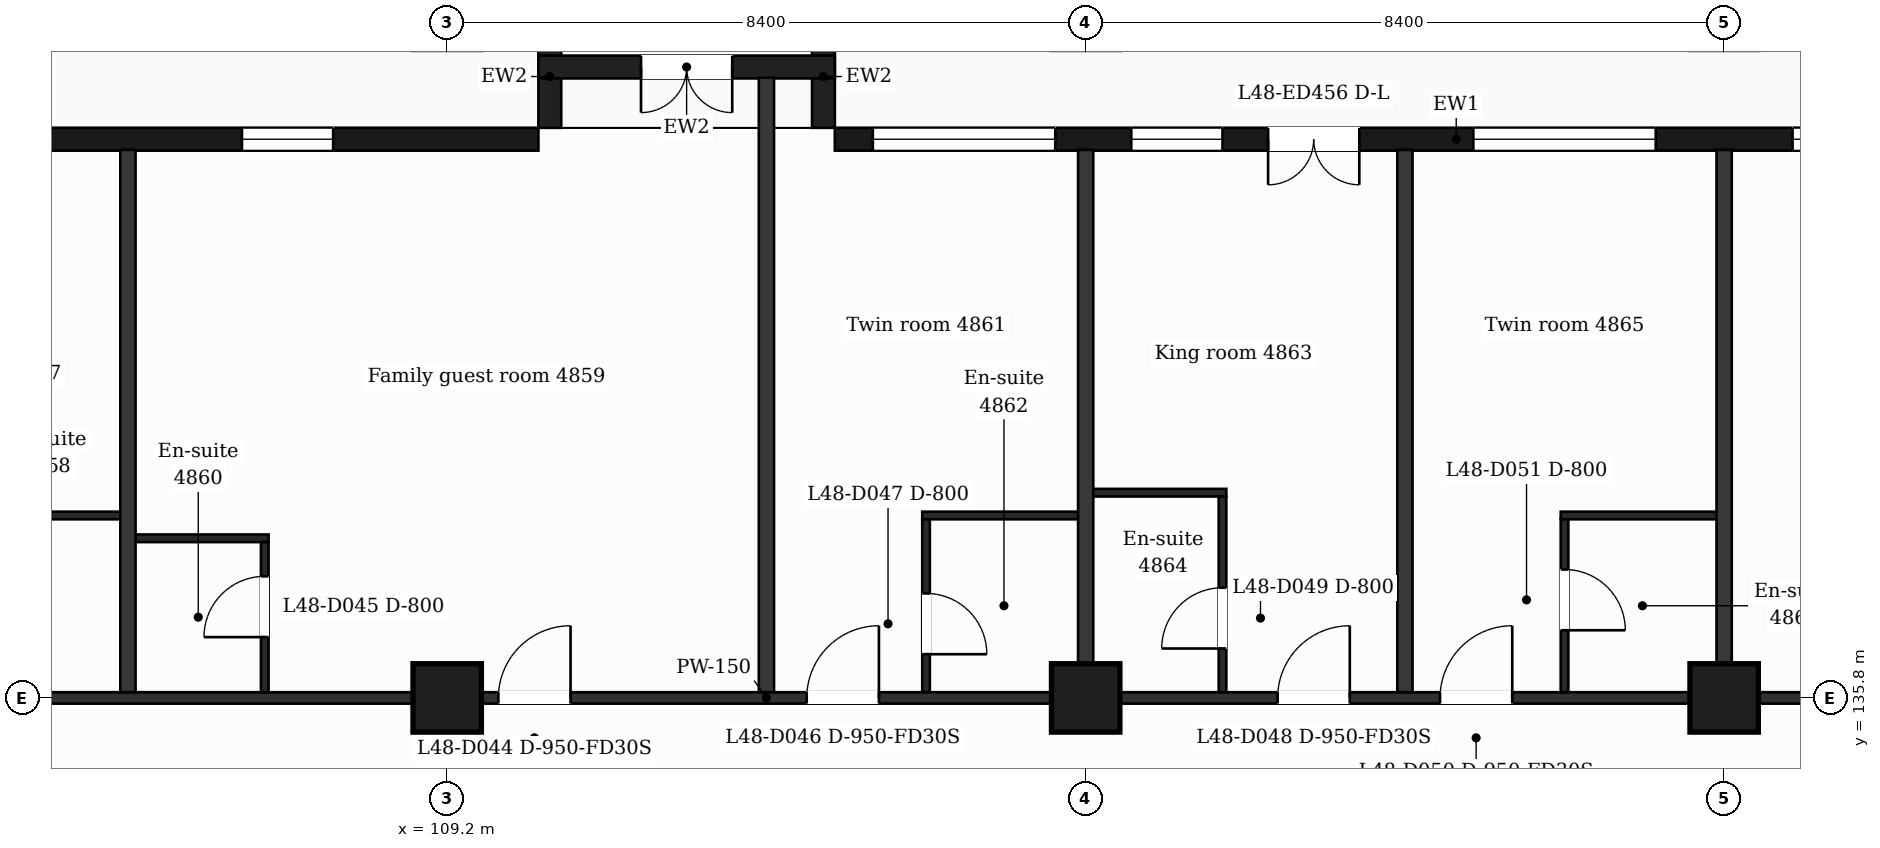
"""IFC4 building model, lengths in metres.
Left out: names, types, materials, properties, quantities, classifications, styles, units other than length and angle.
Written with IfcOpenShell. Run it as: python <this file> out.ifc"""

import sys

from ifc_helpers import new_model, si_unit, direction, frame, frame_2d, origin, origin_2d, place, context, subcontext, project, spatial, rectangle, extrude, element, fill, save


model = new_model("IFC4")
c1 = context("Model", 3, precision=1e-05, world=origin(), true_north=direction((0.0, 1.0)))
c2 = subcontext(c1, "Body", "Model", "MODEL_VIEW")
j1 = project(units=[si_unit("LENGTHUNIT", "METRE"), si_unit("PLANEANGLEUNIT", "RADIAN")], contexts=[c1])
p1 = place(None, origin())
s1 = spatial("IfcSite", under=j1, at=p1, CompositionType="ELEMENT")
p2 = place(p1, origin())
s2 = spatial("IfcBuilding", under=s1, at=p2, CompositionType="ELEMENT")
p3 = place(p2, frame((0.0, 0.0, 202.2)))
s3 = spatial("IfcBuildingStorey", under=s2, at=p3, CompositionType="ELEMENT", Elevation=202.2)
for number, where, z_axis, x_axis in (
    (1, (109.2, 135.8, 0.0), (0.0, 0.0, 1.0), (1.0, 0.0, 0.0)),
    (2, (117.6, 135.8, 0.0), (0.0, 0.0, 1.0), (1.0, 0.0, 0.0)),
    (3, (126.0, 135.8, 0.0), (0.0, 0.0, 1.0), (1.0, 0.0, 0.0)),
):
    element("IfcColumn", number, at=place(p3, frame(where, z_axis=z_axis, x_axis=x_axis)), inside=s3, PredefinedType="COLUMN", context=c2, shape_type="SweptSolid", body=[
        extrude(rectangle(XDim=0.9, YDim=0.9, at=origin_2d()), origin(), (0.0, 0.0, 1.0), 3.7),
    ])
p4 = place(p3, frame((130.65, 143.15, 0.0), z_axis=(0.0, 0.0, 1.0), x_axis=(-1.0, 0.0, 0.0)))
e4 = element("IfcWall", 4, at=p4, inside=s3, PredefinedType="SOLIDWALL", context=c2, shape_type="SweptSolid", body=[
    extrude(rectangle(XDim=16.35, YDim=0.3, at=frame_2d((8.175, 0.0))), origin(), (0.0, 0.0, 1.0), 3.38),
])
p5 = place(p4, frame((1.35, 0.0, 0.9)))
e5 = element("IfcOpeningElement", 5, at=p5, cuts=e4, PredefinedType="OPENING", context=c2, shape_type="SweptSolid", body=[
    extrude(rectangle(XDim=2.4, YDim=2.1, at=frame_2d((1.2, 1.05))), frame((0.0, 0.16, 0.0), z_axis=(0.0, -1.0, 0.0), x_axis=(1.0, 0.0, 0.0)), (0.0, 0.0, 1.0), 0.32),
])
p6 = place(p4, frame((5.55, 0.0, 0.9)))
e6 = element("IfcOpeningElement", 6, at=p6, cuts=e4, PredefinedType="OPENING", context=c2, shape_type="SweptSolid", body=[
    extrude(rectangle(XDim=2.4, YDim=2.1, at=frame_2d((1.2, 1.05))), frame((0.0, 0.16, 0.0), z_axis=(0.0, -1.0, 0.0), x_axis=(1.0, 0.0, 0.0)), (0.0, 0.0, 1.0), 0.32),
])
p7 = place(p4, frame((9.45, 0.0, 0.0)))
e7 = element("IfcOpeningElement", 7, at=p7, cuts=e4, PredefinedType="OPENING", context=c2, shape_type="SweptSolid", body=[
    extrude(rectangle(XDim=1.2, YDim=2.4, at=frame_2d((0.6, 1.2))), frame((0.0, 0.16, 0.0), z_axis=(0.0, -1.0, 0.0), x_axis=(1.0, 0.0, 0.0)), (0.0, 0.0, 1.0), 0.32),
])
p8 = place(p4, frame((11.25, 0.0, 0.9)))
e8 = element("IfcOpeningElement", 8, at=p8, cuts=e4, PredefinedType="OPENING", context=c2, shape_type="SweptSolid", body=[
    extrude(rectangle(XDim=1.2, YDim=2.1, at=frame_2d((0.6, 1.05))), frame((0.0, 0.16, 0.0), z_axis=(0.0, -1.0, 0.0), x_axis=(1.0, 0.0, 0.0)), (0.0, 0.0, 1.0), 0.32),
])
p9 = place(p4, frame((13.45, 0.0, 0.9)))
e9 = element("IfcOpeningElement", 9, at=p9, cuts=e4, PredefinedType="OPENING", context=c2, shape_type="SweptSolid", body=[
    extrude(rectangle(XDim=2.4, YDim=2.1, at=frame_2d((1.2, 1.05))), frame((0.0, 0.16, 0.0), z_axis=(0.0, -1.0, 0.0), x_axis=(1.0, 0.0, 0.0)), (0.0, 0.0, 1.0), 0.32),
])
p10 = place(p3, frame((110.4, 143.15, 0.0), z_axis=(0.0, 0.0, 1.0), x_axis=(-1.0, 0.0, 0.0)))
e10 = element("IfcWall", 10, at=p10, inside=s3, PredefinedType="SOLIDWALL", context=c2, shape_type="SweptSolid", body=[
    extrude(rectangle(XDim=14.4, YDim=0.3, at=frame_2d((7.2, 0.0))), origin(), (0.0, 0.0, 1.0), 3.38),
])
p11 = place(p10, frame((2.7, 0.0, 0.9)))
e11 = element("IfcOpeningElement", 11, at=p11, cuts=e10, PredefinedType="OPENING", context=c2, shape_type="SweptSolid", body=[
    extrude(rectangle(XDim=1.2, YDim=2.1, at=frame_2d((0.6, 1.05))), frame((0.0, 0.16, 0.0), z_axis=(0.0, -1.0, 0.0), x_axis=(1.0, 0.0, 0.0)), (0.0, 0.0, 1.0), 0.32),
])
p12 = place(p10, frame((6.9, 0.0, 0.0)))
e12 = element("IfcOpeningElement", 12, at=p12, cuts=e10, PredefinedType="OPENING", context=c2, shape_type="SweptSolid", body=[
    extrude(rectangle(XDim=1.2, YDim=2.4, at=frame_2d((0.6, 1.2))), frame((0.0, 0.16, 0.0), z_axis=(0.0, -1.0, 0.0), x_axis=(1.0, 0.0, 0.0)), (0.0, 0.0, 1.0), 0.32),
])
p13 = place(p10, frame((10.5, 0.0, 0.9)))
e13 = element("IfcOpeningElement", 13, at=p13, cuts=e10, PredefinedType="OPENING", context=c2, shape_type="SweptSolid", body=[
    extrude(rectangle(XDim=2.4, YDim=2.1, at=frame_2d((1.2, 1.05))), frame((0.0, 0.16, 0.0), z_axis=(0.0, -1.0, 0.0), x_axis=(1.0, 0.0, 0.0)), (0.0, 0.0, 1.0), 0.32),
])
for number, where, z_axis, x_axis in (
    (14, (114.15, 143.3, 0.0), (0.0, 0.0, 1.0), (0.0, 1.0, 0.0)),
    (15, (110.55, 143.3, 0.0), (0.0, 0.0, 1.0), (0.0, 1.0, 0.0)),
):
    element("IfcWall", number, at=place(p3, frame(where, z_axis=z_axis, x_axis=x_axis)), inside=s3, PredefinedType="SOLIDWALL", context=c2, shape_type="SweptSolid", body=[
        extrude(rectangle(XDim=1.35, YDim=0.3, at=frame_2d((0.675, 0.0))), origin(), (0.0, 0.0, 1.0), 3.38),
    ])
p14 = place(p3, frame((114.3, 144.1, 0.0), z_axis=(0.0, 0.0, 1.0), x_axis=(-1.0, 0.0, 0.0)))
e16 = element("IfcWall", 16, at=p14, inside=s3, PredefinedType="SOLIDWALL", context=c2, shape_type="SweptSolid", body=[
    extrude(rectangle(XDim=3.9, YDim=0.3, at=frame_2d((1.95, 0.0))), origin(), (0.0, 0.0, 1.0), 3.38),
])
p15 = place(p14, frame((1.35, 0.0, 0.0)))
e17 = element("IfcOpeningElement", 17, at=p15, cuts=e16, PredefinedType="OPENING", context=c2, shape_type="SweptSolid", body=[
    extrude(rectangle(XDim=1.2, YDim=2.4, at=frame_2d((0.6, 1.2))), frame((0.0, 0.16, 0.0), z_axis=(0.0, -1.0, 0.0), x_axis=(1.0, 0.0, 0.0)), (0.0, 0.0, 1.0), 0.32),
])
p16 = place(p3, frame((90.895, 135.8, 0.0), z_axis=(0.0, 0.0, 1.0), x_axis=(1.0, 0.0, 0.0)))
e18 = element("IfcWall", 18, at=p16, inside=s3, PredefinedType="PARTITIONING", context=c2, shape_type="SweptSolid", body=[
    extrude(rectangle(XDim=45.011, YDim=0.15, at=frame_2d((22.505, 0.0))), origin(), (0.0, 0.0, 1.0), 3.38),
])
p17 = place(p16, frame((7.675, 0.0, 0.0)))
e19 = element("IfcOpeningElement", 19, at=p17, cuts=e18, PredefinedType="OPENING", context=c2, shape_type="SweptSolid", body=[
    extrude(rectangle(XDim=1.0, YDim=2.1, at=frame_2d((0.5, 1.05))), frame((0.0, 0.085, 0.0), z_axis=(0.0, -1.0, 0.0), x_axis=(1.0, 0.0, 0.0)), (0.0, 0.0, 1.0), 0.17),
])
p18 = place(p16, frame((10.575, 0.0, 0.0)))
e20 = element("IfcOpeningElement", 20, at=p18, cuts=e18, PredefinedType="OPENING", context=c2, shape_type="SweptSolid", body=[
    extrude(rectangle(XDim=0.95, YDim=2.1, at=frame_2d((0.475, 1.05))), frame((0.0, 0.085, 0.0), z_axis=(0.0, -1.0, 0.0), x_axis=(1.0, 0.0, 0.0)), (0.0, 0.0, 1.0), 0.17),
])
p19 = place(p16, frame((18.979, 0.0, 0.0)))
e21 = element("IfcOpeningElement", 21, at=p19, cuts=e18, PredefinedType="OPENING", context=c2, shape_type="SweptSolid", body=[
    extrude(rectangle(XDim=0.95, YDim=2.1, at=frame_2d((0.475, 1.05))), frame((0.0, 0.085, 0.0), z_axis=(0.0, -1.0, 0.0), x_axis=(1.0, 0.0, 0.0)), (0.0, 0.0, 1.0), 0.17),
])
p20 = place(p16, frame((23.035, 0.0, 0.0)))
e22 = element("IfcOpeningElement", 22, at=p20, cuts=e18, PredefinedType="OPENING", context=c2, shape_type="SweptSolid", body=[
    extrude(rectangle(XDim=0.95, YDim=2.1, at=frame_2d((0.475, 1.05))), frame((0.0, 0.085, 0.0), z_axis=(0.0, -1.0, 0.0), x_axis=(1.0, 0.0, 0.0)), (0.0, 0.0, 1.0), 0.17),
])
p21 = place(p16, frame((29.23, 0.0, 0.0)))
e23 = element("IfcOpeningElement", 23, at=p21, cuts=e18, PredefinedType="OPENING", context=c2, shape_type="SweptSolid", body=[
    extrude(rectangle(XDim=0.95, YDim=2.1, at=frame_2d((0.475, 1.05))), frame((0.0, 0.085, 0.0), z_axis=(0.0, -1.0, 0.0), x_axis=(1.0, 0.0, 0.0)), (0.0, 0.0, 1.0), 0.17),
])
p22 = place(p16, frame((31.367, 0.0, 0.0)))
e24 = element("IfcOpeningElement", 24, at=p22, cuts=e18, PredefinedType="OPENING", context=c2, shape_type="SweptSolid", body=[
    extrude(rectangle(XDim=0.95, YDim=2.1, at=frame_2d((0.475, 1.05))), frame((0.0, 0.085, 0.0), z_axis=(0.0, -1.0, 0.0), x_axis=(1.0, 0.0, 0.0)), (0.0, 0.0, 1.0), 0.17),
])
p23 = place(p16, frame((39.814, 0.0, 0.0)))
e25 = element("IfcOpeningElement", 25, at=p23, cuts=e18, PredefinedType="OPENING", context=c2, shape_type="SweptSolid", body=[
    extrude(rectangle(XDim=0.95, YDim=2.1, at=frame_2d((0.475, 1.05))), frame((0.0, 0.085, 0.0), z_axis=(0.0, -1.0, 0.0), x_axis=(1.0, 0.0, 0.0)), (0.0, 0.0, 1.0), 0.17),
])
p24 = place(p3, frame((105.0, 137.9, 0.0), z_axis=(0.0, 0.0, 1.0), x_axis=(1.0, 0.0, 0.0)))
e26 = element("IfcWall", 26, at=p24, inside=s3, PredefinedType="PARTITIONING", context=c2, shape_type="SweptSolid", body=[
    extrude(rectangle(XDim=1.85, YDim=0.1, at=frame_2d((0.925, 0.0))), origin(), (0.0, 0.0, 1.0), 3.38),
])
p25 = place(p3, frame((102.85, 138.2, 0.0), z_axis=(0.0, 0.0, 1.0), x_axis=(1.0, 0.0, 0.0)))
e27 = element("IfcWall", 27, at=p25, inside=s3, PredefinedType="PARTITIONING", context=c2, shape_type="SweptSolid", body=[
    extrude(rectangle(XDim=2.15, YDim=0.1, at=frame_2d((1.075, 0.0))), origin(), (0.0, 0.0, 1.0), 3.38),
])
p26 = place(p3, frame((115.45, 138.2, 0.0), z_axis=(0.0, 0.0, 1.0), x_axis=(1.0, 0.0, 0.0)))
e28 = element("IfcWall", 28, at=p26, inside=s3, PredefinedType="PARTITIONING", context=c2, shape_type="SweptSolid", body=[
    extrude(rectangle(XDim=2.15, YDim=0.1, at=frame_2d((1.075, 0.0))), origin(), (0.0, 0.0, 1.0), 3.38),
])
p27 = place(p3, frame((123.85, 138.2, 0.0), z_axis=(0.0, 0.0, 1.0), x_axis=(1.0, 0.0, 0.0)))
e29 = element("IfcWall", 29, at=p27, inside=s3, PredefinedType="PARTITIONING", context=c2, shape_type="SweptSolid", body=[
    extrude(rectangle(XDim=2.15, YDim=0.1, at=frame_2d((1.075, 0.0))), origin(), (0.0, 0.0, 1.0), 3.38),
])
p28 = place(p3, frame((117.6, 138.5, 0.0), z_axis=(0.0, 0.0, 1.0), x_axis=(1.0, 0.0, 0.0)))
e30 = element("IfcWall", 30, at=p28, inside=s3, PredefinedType="PARTITIONING", context=c2, shape_type="SweptSolid", body=[
    extrude(rectangle(XDim=1.85, YDim=0.1, at=frame_2d((0.925, 0.0))), origin(), (0.0, 0.0, 1.0), 3.38),
])
p29 = place(p3, frame((105.0, 135.875, 0.0), z_axis=(0.0, 0.0, 1.0), x_axis=(0.0, 1.0, 0.0)))
e31 = element("IfcWall", 31, at=p29, inside=s3, PredefinedType="PARTITIONING", context=c2, shape_type="SweptSolid", body=[
    extrude(rectangle(XDim=7.135, YDim=0.2, at=frame_2d((3.567, 0.0))), origin(), (0.0, 0.0, 1.0), 3.38),
])
p30 = place(p3, frame((106.8, 135.875, 0.0), z_axis=(0.0, 0.0, 1.0), x_axis=(0.0, 1.0, 0.0)))
e32 = element("IfcWall", 32, at=p30, inside=s3, PredefinedType="PARTITIONING", context=c2, shape_type="SweptSolid", body=[
    extrude(rectangle(XDim=1.975, YDim=0.1, at=frame_2d((0.988, 0.0))), origin(), (0.0, 0.0, 1.0), 3.38),
])
p31 = place(p30, frame((0.725, 0.0, 0.0)))
e33 = element("IfcOpeningElement", 33, at=p31, cuts=e32, PredefinedType="OPENING", context=c2, shape_type="SweptSolid", body=[
    extrude(rectangle(XDim=0.8, YDim=2.1, at=frame_2d((0.4, 1.05))), frame((0.0, 0.06, 0.0), z_axis=(0.0, -1.0, 0.0), x_axis=(1.0, 0.0, 0.0)), (0.0, 0.0, 1.0), 0.12),
])
p32 = place(p3, frame((113.4, 135.875, 0.0), z_axis=(0.0, 0.0, 1.0), x_axis=(0.0, 1.0, 0.0)))
e34 = element("IfcWall", 34, at=p32, inside=s3, PredefinedType="PARTITIONING", context=c2, shape_type="SweptSolid", body=[
    extrude(rectangle(XDim=8.085, YDim=0.2, at=frame_2d((4.042, 0.0))), origin(), (0.0, 0.0, 1.0), 3.38),
])
p33 = place(p3, frame((115.5, 135.875, 0.0), z_axis=(0.0, 0.0, 1.0), x_axis=(0.0, 1.0, 0.0)))
e35 = element("IfcWall", 35, at=p33, inside=s3, PredefinedType="PARTITIONING", context=c2, shape_type="SweptSolid", body=[
    extrude(rectangle(XDim=2.275, YDim=0.1, at=frame_2d((1.137, 0.0))), origin(), (0.0, 0.0, 1.0), 3.38),
])
p34 = place(p33, frame((0.5, 0.0, 0.0)))
e36 = element("IfcOpeningElement", 36, at=p34, cuts=e35, PredefinedType="OPENING", context=c2, shape_type="SweptSolid", body=[
    extrude(rectangle(XDim=0.8, YDim=2.1, at=frame_2d((0.4, 1.05))), frame((0.0, 0.06, 0.0), z_axis=(0.0, -1.0, 0.0), x_axis=(1.0, 0.0, 0.0)), (0.0, 0.0, 1.0), 0.12),
])
p35 = place(p3, frame((117.6, 135.875, 0.0), z_axis=(0.0, 0.0, 1.0), x_axis=(0.0, 1.0, 0.0)))
e37 = element("IfcWall", 37, at=p35, inside=s3, PredefinedType="PARTITIONING", context=c2, shape_type="SweptSolid", body=[
    extrude(rectangle(XDim=7.135, YDim=0.2, at=frame_2d((3.567, 0.0))), origin(), (0.0, 0.0, 1.0), 3.38),
])
p36 = place(p3, frame((119.4, 135.875, 0.0), z_axis=(0.0, 0.0, 1.0), x_axis=(0.0, 1.0, 0.0)))
e38 = element("IfcWall", 38, at=p36, inside=s3, PredefinedType="PARTITIONING", context=c2, shape_type="SweptSolid", body=[
    extrude(rectangle(XDim=2.575, YDim=0.1, at=frame_2d((1.288, 0.0))), origin(), (0.0, 0.0, 1.0), 3.38),
])
p37 = place(p36, frame((0.575, 0.0, 0.0)))
e39 = element("IfcOpeningElement", 39, at=p37, cuts=e38, PredefinedType="OPENING", context=c2, shape_type="SweptSolid", body=[
    extrude(rectangle(XDim=0.8, YDim=2.1, at=frame_2d((0.4, 1.05))), frame((0.0, 0.06, 0.0), z_axis=(0.0, -1.0, 0.0), x_axis=(1.0, 0.0, 0.0)), (0.0, 0.0, 1.0), 0.12),
])
p38 = place(p3, frame((121.8, 135.875, 0.0), z_axis=(0.0, 0.0, 1.0), x_axis=(0.0, 1.0, 0.0)))
e40 = element("IfcWall", 40, at=p38, inside=s3, PredefinedType="PARTITIONING", context=c2, shape_type="SweptSolid", body=[
    extrude(rectangle(XDim=7.135, YDim=0.2, at=frame_2d((3.567, 0.0))), origin(), (0.0, 0.0, 1.0), 3.38),
])
p39 = place(p3, frame((123.9, 135.875, 0.0), z_axis=(0.0, 0.0, 1.0), x_axis=(0.0, 1.0, 0.0)))
e41 = element("IfcWall", 41, at=p39, inside=s3, PredefinedType="PARTITIONING", context=c2, shape_type="SweptSolid", body=[
    extrude(rectangle(XDim=2.275, YDim=0.1, at=frame_2d((1.137, 0.0))), origin(), (0.0, 0.0, 1.0), 3.38),
])
p40 = place(p39, frame((0.815, 0.0, 0.0)))
e42 = element("IfcOpeningElement", 42, at=p40, cuts=e41, PredefinedType="OPENING", context=c2, shape_type="SweptSolid", body=[
    extrude(rectangle(XDim=0.8, YDim=2.1, at=frame_2d((0.4, 1.05))), frame((0.0, 0.06, 0.0), z_axis=(0.0, -1.0, 0.0), x_axis=(1.0, 0.0, 0.0)), (0.0, 0.0, 1.0), 0.12),
])
p41 = place(p3, frame((126.0, 135.875, 0.0), z_axis=(0.0, 0.0, 1.0), x_axis=(0.0, 1.0, 0.0)))
e43 = element("IfcWall", 43, at=p41, inside=s3, PredefinedType="PARTITIONING", context=c2, shape_type="SweptSolid", body=[
    extrude(rectangle(XDim=7.135, YDim=0.2, at=frame_2d((3.567, 0.0))), origin(), (0.0, 0.0, 1.0), 3.38),
])
p42 = place(p5, origin())
e44 = element("IfcWindow", 44, at=p42, inside=s3, PartitioningType="SINGLE_PANEL", PredefinedType="WINDOW", context=c2, shape_type="SweptSolid", body=[
    extrude(rectangle(XDim=2.4, YDim=2.1, at=frame_2d((1.2, 1.05))), frame((0.0, 0.03, 0.0), z_axis=(0.0, -1.0, 0.0), x_axis=(1.0, 0.0, 0.0)), (0.0, 0.0, 1.0), 0.06),
])
fill(e5, e44)
p43 = place(p6, origin())
e45 = element("IfcWindow", 45, at=p43, inside=s3, PartitioningType="SINGLE_PANEL", PredefinedType="WINDOW", context=c2, shape_type="SweptSolid", body=[
    extrude(rectangle(XDim=2.4, YDim=2.1, at=frame_2d((1.2, 1.05))), frame((0.0, 0.03, 0.0), z_axis=(0.0, -1.0, 0.0), x_axis=(1.0, 0.0, 0.0)), (0.0, 0.0, 1.0), 0.06),
])
fill(e6, e45)
p44 = place(p7, origin())
e46 = element("IfcDoor", 46, at=p44, inside=s3, OperationType="DOUBLE_DOOR_SINGLE_SWING", PredefinedType="DOOR", context=c2, shape_type="SweptSolid", body=[
    extrude(rectangle(XDim=1.2, YDim=2.4, at=frame_2d((0.6, 1.2))), frame((0.0, 0.025, 0.0), z_axis=(0.0, -1.0, 0.0), x_axis=(1.0, 0.0, 0.0)), (0.0, 0.0, 1.0), 0.05),
])
fill(e7, e46)
p45 = place(p8, origin())
e47 = element("IfcWindow", 47, at=p45, inside=s3, PartitioningType="SINGLE_PANEL", PredefinedType="WINDOW", context=c2, shape_type="SweptSolid", body=[
    extrude(rectangle(XDim=1.2, YDim=2.1, at=frame_2d((0.6, 1.05))), frame((0.0, 0.03, 0.0), z_axis=(0.0, -1.0, 0.0), x_axis=(1.0, 0.0, 0.0)), (0.0, 0.0, 1.0), 0.06),
])
fill(e8, e47)
p46 = place(p9, origin())
e48 = element("IfcWindow", 48, at=p46, inside=s3, PartitioningType="SINGLE_PANEL", PredefinedType="WINDOW", context=c2, shape_type="SweptSolid", body=[
    extrude(rectangle(XDim=2.4, YDim=2.1, at=frame_2d((1.2, 1.05))), frame((0.0, 0.03, 0.0), z_axis=(0.0, -1.0, 0.0), x_axis=(1.0, 0.0, 0.0)), (0.0, 0.0, 1.0), 0.06),
])
fill(e9, e48)
p47 = place(p11, origin())
e49 = element("IfcWindow", 49, at=p47, inside=s3, PartitioningType="SINGLE_PANEL", PredefinedType="WINDOW", context=c2, shape_type="SweptSolid", body=[
    extrude(rectangle(XDim=1.2, YDim=2.1, at=frame_2d((0.6, 1.05))), frame((0.0, 0.03, 0.0), z_axis=(0.0, -1.0, 0.0), x_axis=(1.0, 0.0, 0.0)), (0.0, 0.0, 1.0), 0.06),
])
fill(e11, e49)
p48 = place(p15, origin())
e50 = element("IfcDoor", 50, at=p48, inside=s3, OperationType="DOUBLE_DOOR_SINGLE_SWING", PredefinedType="DOOR", context=c2, shape_type="SweptSolid", body=[
    extrude(rectangle(XDim=1.2, YDim=2.4, at=frame_2d((0.6, 1.2))), frame((0.0, 0.025, 0.0), z_axis=(0.0, -1.0, 0.0), x_axis=(1.0, 0.0, 0.0)), (0.0, 0.0, 1.0), 0.05),
])
fill(e17, e50)
p49 = place(p19, origin())
e51 = element("IfcDoor", 51, at=p49, inside=s3, OperationType="SINGLE_SWING_RIGHT", PredefinedType="DOOR", context=c2, shape_type="SweptSolid", body=[
    extrude(rectangle(XDim=0.95, YDim=2.1, at=frame_2d((0.475, 1.05))), frame((0.0, 0.025, 0.0), z_axis=(0.0, -1.0, 0.0), x_axis=(1.0, 0.0, 0.0)), (0.0, 0.0, 1.0), 0.05),
])
fill(e21, e51)
p50 = place(p31, origin())
e52 = element("IfcDoor", 52, at=p50, inside=s3, OperationType="SINGLE_SWING_LEFT", PredefinedType="DOOR", context=c2, shape_type="SweptSolid", body=[
    extrude(rectangle(XDim=0.8, YDim=2.1, at=frame_2d((0.4, 1.05))), frame((0.0, 0.025, 0.0), z_axis=(0.0, -1.0, 0.0), x_axis=(1.0, 0.0, 0.0)), (0.0, 0.0, 1.0), 0.05),
])
fill(e33, e52)
p51 = place(p20, origin())
e53 = element("IfcDoor", 53, at=p51, inside=s3, OperationType="SINGLE_SWING_RIGHT", PredefinedType="DOOR", context=c2, shape_type="SweptSolid", body=[
    extrude(rectangle(XDim=0.95, YDim=2.1, at=frame_2d((0.475, 1.05))), frame((0.0, 0.025, 0.0), z_axis=(0.0, -1.0, 0.0), x_axis=(1.0, 0.0, 0.0)), (0.0, 0.0, 1.0), 0.05),
])
fill(e22, e53)
p52 = place(p34, origin())
e54 = element("IfcDoor", 54, at=p52, inside=s3, OperationType="SINGLE_SWING_LEFT", PredefinedType="DOOR", context=c2, shape_type="SweptSolid", body=[
    extrude(rectangle(XDim=0.8, YDim=2.1, at=frame_2d((0.4, 1.05))), frame((0.0, 0.025, 0.0), z_axis=(0.0, -1.0, 0.0), x_axis=(1.0, 0.0, 0.0)), (0.0, 0.0, 1.0), 0.05),
])
fill(e36, e54)
p53 = place(p21, origin())
e55 = element("IfcDoor", 55, at=p53, inside=s3, OperationType="SINGLE_SWING_RIGHT", PredefinedType="DOOR", context=c2, shape_type="SweptSolid", body=[
    extrude(rectangle(XDim=0.95, YDim=2.1, at=frame_2d((0.475, 1.05))), frame((0.0, 0.025, 0.0), z_axis=(0.0, -1.0, 0.0), x_axis=(1.0, 0.0, 0.0)), (0.0, 0.0, 1.0), 0.05),
])
fill(e23, e55)
p54 = place(p37, origin())
e56 = element("IfcDoor", 56, at=p54, inside=s3, OperationType="SINGLE_SWING_LEFT", PredefinedType="DOOR", context=c2, shape_type="SweptSolid", body=[
    extrude(rectangle(XDim=0.8, YDim=2.1, at=frame_2d((0.4, 1.05))), frame((0.0, 0.025, 0.0), z_axis=(0.0, -1.0, 0.0), x_axis=(1.0, 0.0, 0.0)), (0.0, 0.0, 1.0), 0.05),
])
fill(e39, e56)
p55 = place(p22, origin())
e57 = element("IfcDoor", 57, at=p55, inside=s3, OperationType="SINGLE_SWING_RIGHT", PredefinedType="DOOR", context=c2, shape_type="SweptSolid", body=[
    extrude(rectangle(XDim=0.95, YDim=2.1, at=frame_2d((0.475, 1.05))), frame((0.0, 0.025, 0.0), z_axis=(0.0, -1.0, 0.0), x_axis=(1.0, 0.0, 0.0)), (0.0, 0.0, 1.0), 0.05),
])
fill(e24, e57)
p56 = place(p40, origin())
e58 = element("IfcDoor", 58, at=p56, inside=s3, OperationType="SINGLE_SWING_LEFT", PredefinedType="DOOR", context=c2, shape_type="SweptSolid", body=[
    extrude(rectangle(XDim=0.8, YDim=2.1, at=frame_2d((0.4, 1.05))), frame((0.0, 0.025, 0.0), z_axis=(0.0, -1.0, 0.0), x_axis=(1.0, 0.0, 0.0)), (0.0, 0.0, 1.0), 0.05),
])
fill(e42, e58)
save(model, sys.argv[1])
